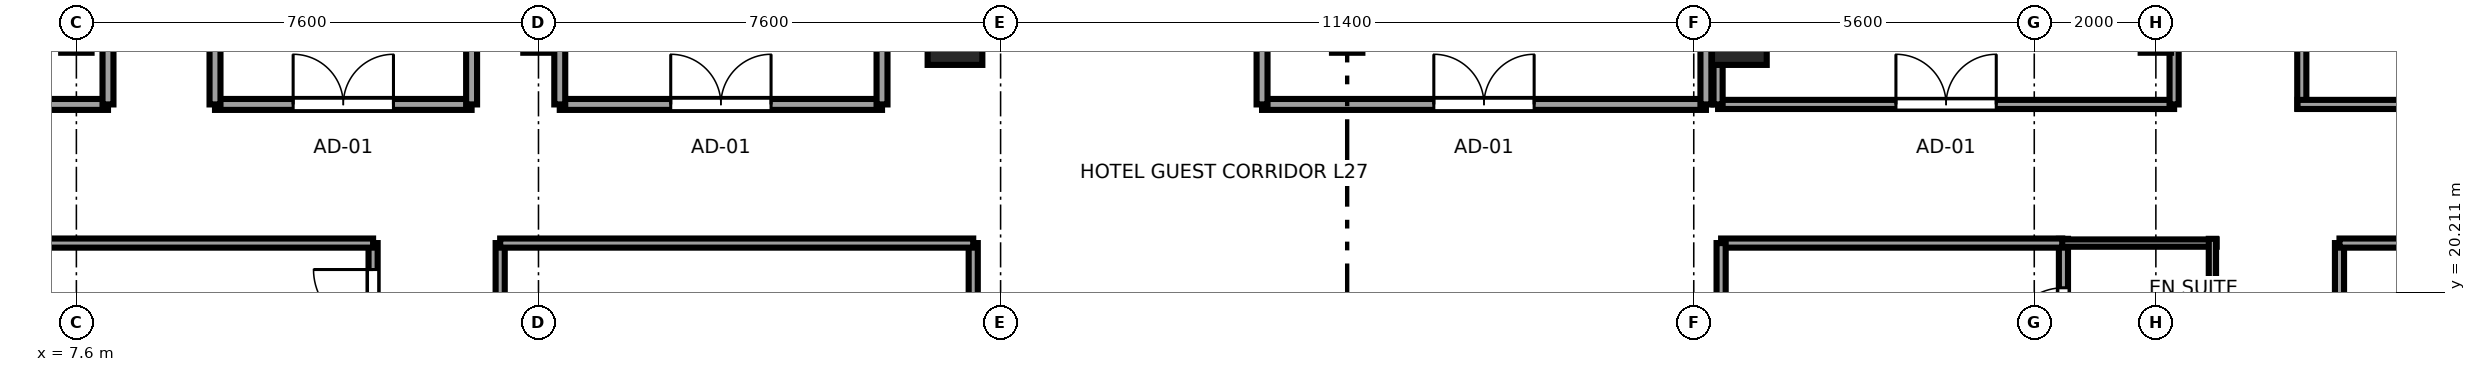
"""IFC4 building model, lengths in metres.
Left out: names, types, materials, properties, quantities, classifications, styles, units other than length and angle.
Written with IfcOpenShell. Run it as: python <this file> out.ifc"""

import sys

from ifc_helpers import new_model, si_unit, direction, frame, frame_2d, origin, origin_2d, place, context, subcontext, project, spatial, rectangle, extrude, source, transform, mapped, element, fill, save


model = new_model("IFC4")
c1 = context("Model", 3, precision=1e-05, world=origin(), true_north=direction((0.0, 1.0)))
c2 = subcontext(c1, "Body", "Model", "MODEL_VIEW")
j1 = project(units=[si_unit("LENGTHUNIT", "METRE"), si_unit("PLANEANGLEUNIT", "RADIAN")], contexts=[c1])
p1 = place(None, origin())
s1 = spatial("IfcSite", under=j1, at=p1, CompositionType="ELEMENT")
p2 = place(p1, origin())
s2 = spatial("IfcBuilding", under=s1, at=p2, CompositionType="ELEMENT")
p3 = place(p2, frame((0.0, 0.0, 108.0)))
s3 = spatial("IfcBuildingStorey", under=s2, at=p3, CompositionType="ELEMENT", Elevation=108.0)
m1 = source(origin(), c2, "Body", "SweptSolid", [
    extrude(rectangle(XDim=0.9, YDim=0.9, at=origin_2d()), origin(), (0.0, 0.0, 1.0), 3.55),
])
for number, where, z_axis, x_axis in (
    (1, (22.05, 24.4, 0.0), (0.0, 0.0, 1.0), (1.0, 0.0, 0.0)),
    (2, (34.95, 24.4, 0.0), (0.0, 0.0, 1.0), (1.0, 0.0, 0.0)),
):
    element("IfcColumn", number, at=place(p3, frame(where, z_axis=z_axis, x_axis=x_axis)), inside=s3, PredefinedType="COLUMN", context=c2, shape_type="MappedRepresentation", body=[
        mapped(m1, transform((0.0, 0.0, 0.0), x_axis=(1.0, 0.0, 0.0), y_axis=(0.0, 1.0, 0.0), z_axis=(0.0, 0.0, 1.0), scale=1.0)),
    ])
p4 = place(p3, frame((40.28, 18.7, 0.0), z_axis=(0.0, 0.0, 1.0), x_axis=(0.0, 1.0, 0.0)))
e3 = element("IfcWall", 3, at=p4, inside=s3, PredefinedType="PARTITIONING", context=c2, shape_type="SweptSolid", body=[
    extrude(rectangle(XDim=2.39, YDim=0.15, at=frame_2d((1.195, 0.0))), origin(), (0.0, 0.0, 1.0), 3.37),
])
p5 = place(p4, frame((0.665, 0.0, 0.0)))
e4 = element("IfcOpeningElement", 4, at=p5, cuts=e3, PredefinedType="OPENING", context=c2, shape_type="SweptSolid", body=[
    extrude(rectangle(XDim=0.92, YDim=2.01, at=frame_2d((0.46, 1.005))), frame((0.0, 0.085, 0.0), z_axis=(0.0, -1.0, 0.0), x_axis=(1.0, 0.0, 0.0)), (0.0, 0.0, 1.0), 0.17),
])
p6 = place(p3, frame((40.21, 21.02, 0.0), z_axis=(0.0, 0.0, 1.0), x_axis=(1.0, 0.0, 0.0)))
e5 = element("IfcWall", 5, at=p6, inside=s3, PredefinedType="PLUMBINGWALL", context=c2, shape_type="SweptSolid", body=[
    extrude(rectangle(XDim=2.59, YDim=0.12, at=frame_2d((1.295, 0.0))), origin(), (0.0, 0.0, 1.0), 3.37),
])
p7 = place(p3, frame((42.73, 18.7, 0.0), z_axis=(0.0, 0.0, 1.0), x_axis=(0.0, 1.0, 0.0)))
e6 = element("IfcWall", 6, at=p7, inside=s3, PredefinedType="PLUMBINGWALL", context=c2, shape_type="SweptSolid", body=[
    extrude(rectangle(XDim=2.39, YDim=0.12, at=frame_2d((1.195, 0.0))), origin(), (0.0, 0.0, 1.0), 3.37),
])
p8 = place(p3, frame((12.48, 19.21, 0.0), z_axis=(0.0, 0.0, 1.0), x_axis=(0.0, 1.0, 0.0)))
e7 = element("IfcWall", 7, at=p8, inside=s3, PredefinedType="PARTITIONING", context=c2, shape_type="SweptSolid", body=[
    extrude(rectangle(XDim=1.81, YDim=0.15, at=frame_2d((0.905, 0.0))), origin(), (0.0, 0.0, 1.0), 3.37),
])
p9 = place(p8, frame((0.395, 0.0, 0.0)))
e8 = element("IfcOpeningElement", 8, at=p9, cuts=e7, PredefinedType="OPENING", context=c2, shape_type="SweptSolid", body=[
    extrude(rectangle(XDim=0.98, YDim=2.12, at=frame_2d((0.49, 1.06))), frame((0.0, 0.085, 0.0), z_axis=(0.0, -1.0, 0.0), x_axis=(1.0, 0.0, 0.0)), (0.0, 0.0, 1.0), 0.17),
])
p10 = place(p3, frame((0.405, 21.02, 0.0), z_axis=(0.0, 0.0, 1.0), x_axis=(1.0, 0.0, 0.0)))
e9 = element("IfcWall", 9, at=p10, inside=s3, PredefinedType="PARTITIONING", context=c2, shape_type="SweptSolid", body=[
    extrude(rectangle(XDim=12.075, YDim=0.15, at=frame_2d((6.038, 0.0))), origin(), (0.0, 0.0, 1.0), 3.37),
])
p11 = place(p3, frame((14.57, 13.01, 0.0), z_axis=(0.0, 0.0, 1.0), x_axis=(0.0, 1.0, 0.0)))
e10 = element("IfcWall", 10, at=p11, inside=s3, PredefinedType="PARTITIONING", context=c2, shape_type="SweptSolid", body=[
    extrude(rectangle(XDim=8.01, YDim=0.15, at=frame_2d((4.005, 0.0))), origin(), (0.0, 0.0, 1.0), 3.37),
])
p12 = place(p11, frame((4.445, 0.0, 0.0)))
e11 = element("IfcOpeningElement", 11, at=p12, cuts=e10, PredefinedType="OPENING", context=c2, shape_type="SweptSolid", body=[
    extrude(rectangle(XDim=0.98, YDim=2.12, at=frame_2d((0.49, 1.06))), frame((0.0, 0.085, 0.0), z_axis=(0.0, -1.0, 0.0), x_axis=(1.0, 0.0, 0.0)), (0.0, 0.0, 1.0), 0.17),
])
p13 = place(p3, frame((22.35, 10.68, 0.0), z_axis=(0.0, 0.0, 1.0), x_axis=(0.0, 1.0, 0.0)))
e12 = element("IfcWall", 12, at=p13, inside=s3, PredefinedType="PARTITIONING", context=c2, shape_type="SweptSolid", body=[
    extrude(rectangle(XDim=10.34, YDim=0.15, at=frame_2d((5.17, 0.0))), origin(), (0.0, 0.0, 1.0), 3.37),
])
p14 = place(p3, frame((14.57, 21.02, 0.0), z_axis=(0.0, 0.0, 1.0), x_axis=(1.0, 0.0, 0.0)))
e13 = element("IfcWall", 13, at=p14, inside=s3, PredefinedType="PARTITIONING", context=c2, shape_type="SweptSolid", body=[
    extrude(rectangle(XDim=7.78, YDim=0.15, at=frame_2d((3.89, 0.0))), origin(), (0.0, 0.0, 1.0), 3.37),
])
p15 = place(p3, frame((34.65, 21.02, 0.0), z_axis=(0.0, 0.0, 1.0), x_axis=(1.0, 0.0, 0.0)))
e14 = element("IfcWall", 14, at=p15, inside=s3, PredefinedType="PARTITIONING", context=c2, shape_type="SweptSolid", body=[
    extrude(rectangle(XDim=5.61, YDim=0.15, at=frame_2d((2.805, 0.0))), origin(), (0.0, 0.0, 1.0), 3.37),
])
p16 = place(p3, frame((34.65, 14.08, 0.0), z_axis=(0.0, 0.0, 1.0), x_axis=(0.0, 1.0, 0.0)))
e15 = element("IfcWall", 15, at=p16, inside=s3, PredefinedType="PARTITIONING", context=c2, shape_type="SweptSolid", body=[
    extrude(rectangle(XDim=6.94, YDim=0.15, at=frame_2d((3.47, 0.0))), origin(), (0.0, 0.0, 1.0), 3.37),
])
p17 = place(p3, frame((44.82, 17.913, 0.0), z_axis=(0.0, 0.0, 1.0), x_axis=(0.0, 1.0, 0.0)))
e16 = element("IfcWall", 16, at=p17, inside=s3, PredefinedType="PARTITIONING", context=c2, shape_type="SweptSolid", body=[
    extrude(rectangle(XDim=3.107, YDim=0.15, at=frame_2d((1.553, 0.0))), origin(), (0.0, 0.0, 1.0), 3.37),
])
p18 = place(p17, frame((1.043, 0.0, 0.0)))
e17 = element("IfcOpeningElement", 17, at=p18, cuts=e16, PredefinedType="OPENING", context=c2, shape_type="SweptSolid", body=[
    extrude(rectangle(XDim=0.98, YDim=2.12, at=frame_2d((0.49, 1.06))), frame((0.0, 0.085, 0.0), z_axis=(0.0, -1.0, 0.0), x_axis=(1.0, 0.0, 0.0)), (0.0, 0.0, 1.0), 0.17),
])
p19 = place(p3, frame((44.82, 21.02, 0.0), z_axis=(0.0, 0.0, 1.0), x_axis=(1.0, 0.0, 0.0)))
e18 = element("IfcWall", 18, at=p19, inside=s3, PredefinedType="PARTITIONING", context=c2, shape_type="SweptSolid", body=[
    extrude(rectangle(XDim=11.775, YDim=0.15, at=frame_2d((5.887, 0.0))), origin(), (0.0, 0.0, 1.0), 3.37),
])
p20 = place(p3, frame((0.405, 23.3, 0.0), z_axis=(0.0, 0.0, 1.0), x_axis=(1.0, 0.0, 0.0)))
e19 = element("IfcWall", 19, at=p20, inside=s3, PredefinedType="PARTITIONING", context=c2, shape_type="SweptSolid", body=[
    extrude(rectangle(XDim=7.715, YDim=0.18, at=frame_2d((3.857, 0.0))), origin(), (0.0, 0.0, 1.0), 3.37),
])
p21 = place(p3, frame((8.12, 23.3, 0.0), z_axis=(0.0, 0.0, 1.0), x_axis=(0.0, 1.0, 0.0)))
e20 = element("IfcWall", 20, at=p21, inside=s3, PredefinedType="PARTITIONING", context=c2, shape_type="SweptSolid", body=[
    extrude(rectangle(XDim=7.9, YDim=0.18, at=frame_2d((3.95, 0.0))), origin(), (0.0, 0.0, 1.0), 3.37),
])
p22 = place(p21, frame((3.125, 0.0, 0.0)))
e21 = element("IfcOpeningElement", 21, at=p22, cuts=e20, PredefinedType="OPENING", context=c2, shape_type="SweptSolid", body=[
    extrude(rectangle(XDim=1.65, YDim=2.15, at=frame_2d((0.825, 1.075))), frame((0.0, 0.1, 0.0), z_axis=(0.0, -1.0, 0.0), x_axis=(1.0, 0.0, 0.0)), (0.0, 0.0, 1.0), 0.2),
])
p23 = place(p3, frame((44.2, 23.23, 0.0), z_axis=(0.0, 0.0, 1.0), x_axis=(0.0, 1.0, 0.0)))
e22 = element("IfcWall", 22, at=p23, inside=s3, PredefinedType="PARTITIONING", context=c2, shape_type="SweptSolid", body=[
    extrude(rectangle(XDim=3.94, YDim=0.15, at=frame_2d((1.97, 0.0))), origin(), (0.0, 0.0, 1.0), 3.37),
])
p24 = place(p23, frame((1.34, 0.0, 0.0)))
e23 = element("IfcOpeningElement", 23, at=p24, cuts=e22, PredefinedType="OPENING", context=c2, shape_type="SweptSolid", body=[
    extrude(rectangle(XDim=0.92, YDim=2.01, at=frame_2d((0.46, 1.005))), frame((0.0, 0.085, 0.0), z_axis=(0.0, -1.0, 0.0), x_axis=(1.0, 0.0, 0.0)), (0.0, 0.0, 1.0), 0.17),
])
p25 = place(p3, frame((44.13, 23.3, 0.0), z_axis=(0.0, 0.0, 1.0), x_axis=(1.0, 0.0, 0.0)))
e24 = element("IfcWall", 24, at=p25, inside=s3, PredefinedType="PARTITIONING", context=c2, shape_type="SweptSolid", body=[
    extrude(rectangle(XDim=4.54, YDim=0.15, at=frame_2d((2.27, 0.0))), origin(), (0.0, 0.0, 1.0), 3.37),
])
p26 = place(p3, frame((9.88, 23.3, 0.0), z_axis=(0.0, 0.0, 1.0), x_axis=(1.0, 0.0, 0.0)))
e25 = element("IfcWall", 25, at=p26, inside=s3, PredefinedType="PARTITIONING", context=c2, shape_type="SweptSolid", body=[
    extrude(rectangle(XDim=4.22, YDim=0.18, at=frame_2d((2.11, 0.0))), origin(), (0.0, 0.0, 1.0), 3.37),
])
p27 = place(p26, frame((1.285, 0.0, 0.0)))
e26 = element("IfcOpeningElement", 26, at=p27, cuts=e25, PredefinedType="OPENING", context=c2, shape_type="SweptSolid", body=[
    extrude(rectangle(XDim=1.65, YDim=2.15, at=frame_2d((0.825, 1.075))), frame((0.0, 0.1, 0.0), z_axis=(0.0, -1.0, 0.0), x_axis=(1.0, 0.0, 0.0)), (0.0, 0.0, 1.0), 0.2),
])
for number, where, z_axis, x_axis in (
    (27, (9.88, 23.3, 0.0), (0.0, 0.0, 1.0), (0.0, 1.0, 0.0)),
    (28, (14.1, 23.3, 0.0), (0.0, 0.0, 1.0), (0.0, 1.0, 0.0)),
):
    element("IfcWall", number, at=place(p3, frame(where, z_axis=z_axis, x_axis=x_axis)), inside=s3, PredefinedType="PARTITIONING", context=c2, shape_type="SweptSolid", body=[
        extrude(rectangle(XDim=6.45, YDim=0.18, at=frame_2d((3.225, 0.0))), origin(), (0.0, 0.0, 1.0), 3.37),
    ])
p28 = place(p3, frame((27.1, 23.3, 0.0), z_axis=(0.0, 0.0, 1.0), x_axis=(1.0, 0.0, 0.0)))
e29 = element("IfcWall", 29, at=p28, inside=s3, PredefinedType="PARTITIONING", context=c2, shape_type="SweptSolid", body=[
    extrude(rectangle(XDim=7.3, YDim=0.18, at=frame_2d((3.65, 0.0))), origin(), (0.0, 0.0, 1.0), 3.37),
])
p29 = place(p28, frame((2.825, 0.0, 0.0)))
e30 = element("IfcOpeningElement", 30, at=p29, cuts=e29, PredefinedType="OPENING", context=c2, shape_type="SweptSolid", body=[
    extrude(rectangle(XDim=1.65, YDim=2.15, at=frame_2d((0.825, 1.075))), frame((0.0, 0.1, 0.0), z_axis=(0.0, -1.0, 0.0), x_axis=(1.0, 0.0, 0.0)), (0.0, 0.0, 1.0), 0.2),
])
for number, where, z_axis, x_axis in (
    (31, (27.1, 23.3, 0.0), (0.0, 0.0, 1.0), (0.0, 1.0, 0.0)),
    (32, (34.4, 23.3, 0.0), (0.0, 0.0, 1.0), (0.0, 1.0, 0.0)),
):
    element("IfcWall", number, at=place(p3, frame(where, z_axis=z_axis, x_axis=x_axis)), inside=s3, PredefinedType="PARTITIONING", context=c2, shape_type="SweptSolid", body=[
        extrude(rectangle(XDim=6.5, YDim=0.18, at=frame_2d((3.25, 0.0))), origin(), (0.0, 0.0, 1.0), 3.37),
    ])
p30 = place(p3, frame((15.55, 23.3, 0.0), z_axis=(0.0, 0.0, 1.0), x_axis=(1.0, 0.0, 0.0)))
e33 = element("IfcWall", 33, at=p30, inside=s3, PredefinedType="PARTITIONING", context=c2, shape_type="SweptSolid", body=[
    extrude(rectangle(XDim=5.3, YDim=0.18, at=frame_2d((2.65, 0.0))), origin(), (0.0, 0.0, 1.0), 3.37),
])
p31 = place(p30, frame((1.825, 0.0, 0.0)))
e34 = element("IfcOpeningElement", 34, at=p31, cuts=e33, PredefinedType="OPENING", context=c2, shape_type="SweptSolid", body=[
    extrude(rectangle(XDim=1.65, YDim=2.15, at=frame_2d((0.825, 1.075))), frame((0.0, 0.1, 0.0), z_axis=(0.0, -1.0, 0.0), x_axis=(1.0, 0.0, 0.0)), (0.0, 0.0, 1.0), 0.2),
])
for number, where, z_axis, x_axis in (
    (35, (15.55, 23.3, 0.0), (0.0, 0.0, 1.0), (0.0, 1.0, 0.0)),
    (36, (20.85, 23.3, 0.0), (0.0, 0.0, 1.0), (0.0, 1.0, 0.0)),
):
    element("IfcWall", number, at=place(p3, frame(where, z_axis=z_axis, x_axis=x_axis)), inside=s3, PredefinedType="PARTITIONING", context=c2, shape_type="SweptSolid", body=[
        extrude(rectangle(XDim=6.5, YDim=0.18, at=frame_2d((3.25, 0.0))), origin(), (0.0, 0.0, 1.0), 3.37),
    ])
p32 = place(p3, frame((34.6, 23.3, 0.0), z_axis=(0.0, 0.0, 1.0), x_axis=(1.0, 0.0, 0.0)))
e37 = element("IfcWall", 37, at=p32, inside=s3, PredefinedType="PARTITIONING", context=c2, shape_type="SweptSolid", body=[
    extrude(rectangle(XDim=7.5, YDim=0.15, at=frame_2d((3.75, 0.0))), origin(), (0.0, 0.0, 1.0), 3.37),
])
p33 = place(p32, frame((2.925, 0.0, 0.0)))
e38 = element("IfcOpeningElement", 38, at=p33, cuts=e37, PredefinedType="OPENING", context=c2, shape_type="SweptSolid", body=[
    extrude(rectangle(XDim=1.65, YDim=2.15, at=frame_2d((0.825, 1.075))), frame((0.0, 0.085, 0.0), z_axis=(0.0, -1.0, 0.0), x_axis=(1.0, 0.0, 0.0)), (0.0, 0.0, 1.0), 0.17),
])
p34 = place(p3, frame((34.6, 23.3, 0.0), z_axis=(0.0, 0.0, 1.0), x_axis=(0.0, 1.0, 0.0)))
e39 = element("IfcWall", 39, at=p34, inside=s3, PredefinedType="PARTITIONING", context=c2, shape_type="SweptSolid", body=[
    extrude(rectangle(XDim=6.1, YDim=0.15, at=frame_2d((3.05, 0.0))), origin(), (0.0, 0.0, 1.0), 3.37),
])
p35 = place(p3, frame((42.1, 23.3, 0.0), z_axis=(0.0, 0.0, 1.0), x_axis=(0.0, 1.0, 0.0)))
e40 = element("IfcWall", 40, at=p35, inside=s3, PredefinedType="PARTITIONING", context=c2, shape_type="SweptSolid", body=[
    extrude(rectangle(XDim=6.1, YDim=0.15, at=frame_2d((3.05, 0.0))), origin(), (0.0, 0.0, 1.0), 2.16),
])
m2 = source(origin(), c2, "Body", "SweptSolid", [
    extrude(rectangle(XDim=0.92, YDim=2.01, at=frame_2d((0.46, 1.005))), frame((0.0, 0.025, 0.0), z_axis=(0.0, -1.0, 0.0), x_axis=(1.0, 0.0, 0.0)), (0.0, 0.0, 1.0), 0.05),
])
p36 = place(p5, origin())
e41 = element("IfcDoor", 41, at=p36, inside=s3, OperationType="SINGLE_SWING_LEFT", PredefinedType="DOOR", context=c2, shape_type="MappedRepresentation", body=[
    mapped(m2, transform((0.0, 0.0, 0.0), x_axis=(1.0, 0.0, 0.0), y_axis=(0.0, 1.0, 0.0), z_axis=(0.0, 0.0, 1.0), scale=1.0)),
])
fill(e4, e41)
m3 = source(origin(), c2, "Body", "SweptSolid", [
    extrude(rectangle(XDim=0.98, YDim=2.12, at=frame_2d((0.49, 1.06))), frame((0.0, 0.025, 0.0), z_axis=(0.0, -1.0, 0.0), x_axis=(1.0, 0.0, 0.0)), (0.0, 0.0, 1.0), 0.05),
])
p37 = place(p9, origin())
e42 = element("IfcDoor", 42, at=p37, inside=s3, OperationType="SINGLE_SWING_RIGHT", PredefinedType="DOOR", context=c2, shape_type="MappedRepresentation", body=[
    mapped(m3, transform((0.0, 0.0, 0.0), x_axis=(1.0, 0.0, 0.0), y_axis=(0.0, 1.0, 0.0), z_axis=(0.0, 0.0, 1.0), scale=1.0)),
])
fill(e8, e42)
m4 = source(origin(), c2, "Body", "SweptSolid", [
    extrude(rectangle(XDim=1.65, YDim=2.15, at=frame_2d((0.825, 1.075))), frame((0.0, 0.025, 0.0), z_axis=(0.0, -1.0, 0.0), x_axis=(1.0, 0.0, 0.0)), (0.0, 0.0, 1.0), 0.05),
])
p38 = place(p27, origin())
e43 = element("IfcDoor", 43, at=p38, inside=s3, OperationType="DOUBLE_DOOR_SINGLE_SWING", PredefinedType="DOOR", context=c2, shape_type="MappedRepresentation", body=[
    mapped(m4, transform((0.0, 0.0, 0.0), x_axis=(1.0, 0.0, 0.0), y_axis=(0.0, 1.0, 0.0), z_axis=(0.0, 0.0, 1.0), scale=1.0)),
])
fill(e26, e43)
p39 = place(p29, origin())
e44 = element("IfcDoor", 44, at=p39, inside=s3, OperationType="DOUBLE_DOOR_SINGLE_SWING", PredefinedType="DOOR", context=c2, shape_type="MappedRepresentation", body=[
    mapped(m4, transform((0.0, 0.0, 0.0), x_axis=(1.0, 0.0, 0.0), y_axis=(0.0, 1.0, 0.0), z_axis=(0.0, 0.0, 1.0), scale=1.0)),
])
fill(e30, e44)
p40 = place(p31, origin())
e45 = element("IfcDoor", 45, at=p40, inside=s3, OperationType="DOUBLE_DOOR_SINGLE_SWING", PredefinedType="DOOR", context=c2, shape_type="MappedRepresentation", body=[
    mapped(m4, transform((0.0, 0.0, 0.0), x_axis=(1.0, 0.0, 0.0), y_axis=(0.0, 1.0, 0.0), z_axis=(0.0, 0.0, 1.0), scale=1.0)),
])
fill(e34, e45)
p41 = place(p33, origin())
e46 = element("IfcDoor", 46, at=p41, inside=s3, OperationType="DOUBLE_DOOR_SINGLE_SWING", PredefinedType="DOOR", context=c2, shape_type="MappedRepresentation", body=[
    mapped(m4, transform((0.0, 0.0, 0.0), x_axis=(1.0, 0.0, 0.0), y_axis=(0.0, 1.0, 0.0), z_axis=(0.0, 0.0, 1.0), scale=1.0)),
])
fill(e38, e46)
save(model, sys.argv[1])
